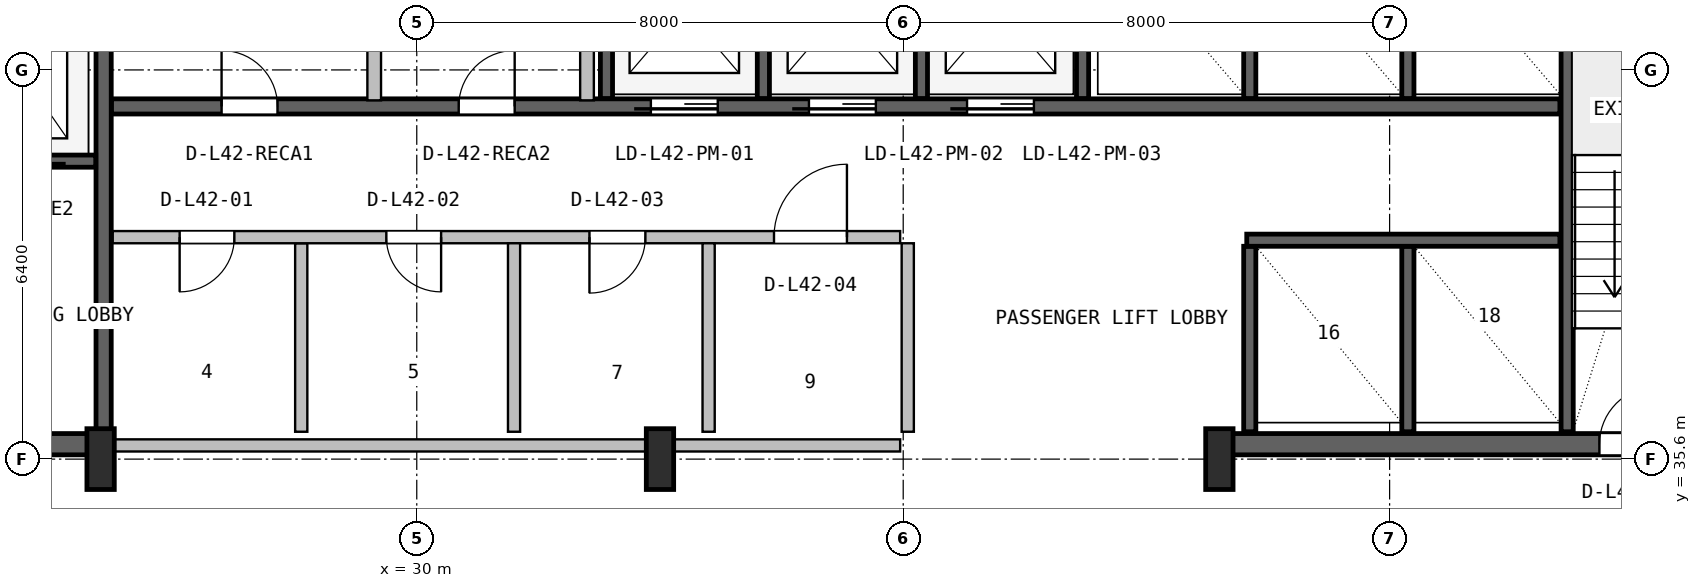
"""IFC4 building model, lengths in metres.
Left out: names, types, materials, properties, quantities, classifications, styles, units other than length and angle.
Written with IfcOpenShell. Run it as: python <this file> out.ifc"""

import sys

from ifc_helpers import new_model, si_unit, direction, frame, frame_2d, origin, origin_2d, place, context, subcontext, project, spatial, rectangle, i_section, extrude, source, transform, mapped, element, fill, save


model = new_model("IFC4")
c1 = context("Model", 3, precision=1e-05, world=origin(), true_north=direction((0.0, 1.0)))
c2 = subcontext(c1, "Body", "Model", "MODEL_VIEW")
j1 = project(units=[si_unit("LENGTHUNIT", "METRE"), si_unit("PLANEANGLEUNIT", "RADIAN")], contexts=[c1])
p1 = place(None, origin())
s1 = spatial("IfcSite", under=j1, at=p1, CompositionType="ELEMENT")
p2 = place(p1, origin())
s2 = spatial("IfcBuilding", under=s1, at=p2, CompositionType="ELEMENT")
p3 = place(p2, frame((0.0, 0.0, 172.4)))
s3 = spatial("IfcBuildingStorey", under=s2, at=p3, CompositionType="ELEMENT", Elevation=172.4)
p4 = place(p3, frame((15.67, 35.845, 0.0), z_axis=(0.0, 0.0, 1.0), x_axis=(1.0, 0.0, 0.0)))
e1 = element("IfcWall", 1, at=p4, inside=s3, PredefinedType="SHEAR", context=c2, shape_type="SweptSolid", body=[
    extrude(rectangle(XDim=9.13, YDim=0.35, at=frame_2d((4.565, 0.0))), origin(), (0.0, 0.0, 1.0), 3.55),
])
p5 = place(p4, frame((5.4, 0.0, 0.0)))
e2 = element("IfcOpeningElement", 2, at=p5, cuts=e1, PredefinedType="OPENING", context=c2, shape_type="SweptSolid", body=[
    extrude(rectangle(XDim=1.0, YDim=2.1, at=frame_2d((0.5, 1.05))), frame((0.0, 0.185, 0.0), z_axis=(0.0, -1.0, 0.0), x_axis=(1.0, 0.0, 0.0)), (0.0, 0.0, 1.0), 0.37),
])
p6 = place(p3, frame((43.2, 35.845, 0.0), z_axis=(0.0, 0.0, 1.0), x_axis=(1.0, 0.0, 0.0)))
e3 = element("IfcWall", 3, at=p6, inside=s3, PredefinedType="SHEAR", context=c2, shape_type="SweptSolid", body=[
    extrude(rectangle(XDim=9.13, YDim=0.35, at=frame_2d((4.565, 0.0))), origin(), (0.0, 0.0, 1.0), 3.55),
])
p7 = place(p6, frame((6.25, 0.0, 0.0)))
e4 = element("IfcOpeningElement", 4, at=p7, cuts=e3, PredefinedType="OPENING", context=c2, shape_type="SweptSolid", body=[
    extrude(rectangle(XDim=0.95, YDim=2.1, at=frame_2d((0.475, 1.05))), frame((0.0, 0.185, 0.0), z_axis=(0.0, -1.0, 0.0), x_axis=(1.0, 0.0, 0.0)), (0.0, 0.0, 1.0), 0.37),
])
m1 = source(origin(), c2, "Body", "SweptSolid", [
    extrude(i_section(OverallWidth=0.45, OverallDepth=1.0, WebThickness=0.016, FlangeThickness=0.03, FilletRadius=0.016, at=origin_2d()), origin(), (0.0, 0.0, 1.0), 3.8),
])
for number, where, z_axis, x_axis in (
    (5, (24.8, 35.6, 0.0), (0.0, 0.0, 1.0), (1.0, 0.0, 0.0)),
    (6, (34.0, 35.6, 0.0), (0.0, 0.0, 1.0), (1.0, 0.0, 0.0)),
    (7, (43.2, 35.6, 0.0), (0.0, 0.0, 1.0), (1.0, 0.0, 0.0)),
):
    element("IfcColumn", number, at=place(p3, frame(where, z_axis=z_axis, x_axis=x_axis)), inside=s3, PredefinedType="COLUMN", context=c2, shape_type="MappedRepresentation", body=[
        mapped(m1, transform((0.0, 0.0, 0.0), x_axis=(1.0, 0.0, 0.0), y_axis=(0.0, 1.0, 0.0), z_axis=(0.0, 0.0, 1.0), scale=1.0)),
    ])
p8 = place(p3, frame((24.85, 36.05, 0.0), z_axis=(0.0, 0.0, 1.0), x_axis=(0.0, 1.0, 0.0)))
e8 = element("IfcWall", 8, at=p8, inside=s3, PredefinedType="SHEAR", context=c2, shape_type="SweptSolid", body=[
    extrude(rectangle(XDim=10.45, YDim=0.25, at=frame_2d((5.225, 0.0))), origin(), (0.0, 0.0, 1.0), 3.55),
])
p9 = place(p3, frame((19.2, 40.5, 0.0), z_axis=(0.0, 0.0, 1.0), x_axis=(1.0, 0.0, 0.0)))
e9 = element("IfcWall", 9, at=p9, inside=s3, PredefinedType="SHEAR", context=c2, shape_type="SweptSolid", body=[
    extrude(rectangle(XDim=5.52, YDim=0.2, at=frame_2d((2.76, 0.0))), origin(), (0.0, 0.0, 1.0), 3.55),
])
p10 = place(p9, frame((1.05, 0.0, 0.0)))
e10 = element("IfcOpeningElement", 10, at=p10, cuts=e9, PredefinedType="OPENING", context=c2, shape_type="SweptSolid", body=[
    extrude(rectangle(XDim=1.1, YDim=2.18, at=frame_2d((0.55, 1.09))), frame((0.0, 0.11, 0.0), z_axis=(0.0, -1.0, 0.0), x_axis=(1.0, 0.0, 0.0)), (0.0, 0.0, 1.0), 0.22),
])
p11 = place(p9, frame((3.65, 0.0, 0.0)))
e11 = element("IfcOpeningElement", 11, at=p11, cuts=e9, PredefinedType="OPENING", context=c2, shape_type="SweptSolid", body=[
    extrude(rectangle(XDim=1.1, YDim=2.18, at=frame_2d((0.55, 1.09))), frame((0.0, 0.11, 0.0), z_axis=(0.0, -1.0, 0.0), x_axis=(1.0, 0.0, 0.0)), (0.0, 0.0, 1.0), 0.22),
])
p12 = place(p3, frame((48.92, 36.05, 0.0), z_axis=(0.0, 0.0, 1.0), x_axis=(0.0, 1.0, 0.0)))
e12 = element("IfcWall", 12, at=p12, inside=s3, PredefinedType="SHEAR", context=c2, shape_type="SweptSolid", body=[
    extrude(rectangle(XDim=10.5, YDim=0.2, at=frame_2d((5.25, 0.0))), origin(), (0.0, 0.0, 1.0), 3.55),
])
p13 = place(p3, frame((24.98, 41.4, 0.0), z_axis=(0.0, 0.0, 1.0), x_axis=(1.0, 0.0, 0.0)))
e13 = element("IfcWall", 13, at=p13, inside=s3, PredefinedType="SHEAR", context=c2, shape_type="SweptSolid", body=[
    extrude(rectangle(XDim=23.82, YDim=0.25, at=frame_2d((11.91, 0.0))), origin(), (0.0, 0.0, 1.0), 3.55),
])
p14 = place(p13, frame((8.87, 0.0, 0.0)))
e14 = element("IfcOpeningElement", 14, at=p14, cuts=e13, PredefinedType="OPENING", context=c2, shape_type="SweptSolid", body=[
    extrude(rectangle(XDim=1.1, YDim=2.18, at=frame_2d((0.55, 1.09))), frame((0.0, 0.135, 0.0), z_axis=(0.0, -1.0, 0.0), x_axis=(1.0, 0.0, 0.0)), (0.0, 0.0, 1.0), 0.27),
])
p15 = place(p13, frame((11.47, 0.0, 0.0)))
e15 = element("IfcOpeningElement", 15, at=p15, cuts=e13, PredefinedType="OPENING", context=c2, shape_type="SweptSolid", body=[
    extrude(rectangle(XDim=1.1, YDim=2.18, at=frame_2d((0.55, 1.09))), frame((0.0, 0.135, 0.0), z_axis=(0.0, -1.0, 0.0), x_axis=(1.0, 0.0, 0.0)), (0.0, 0.0, 1.0), 0.27),
])
p16 = place(p13, frame((14.07, 0.0, 0.0)))
e16 = element("IfcOpeningElement", 16, at=p16, cuts=e13, PredefinedType="OPENING", context=c2, shape_type="SweptSolid", body=[
    extrude(rectangle(XDim=1.1, YDim=2.18, at=frame_2d((0.55, 1.09))), frame((0.0, 0.135, 0.0), z_axis=(0.0, -1.0, 0.0), x_axis=(1.0, 0.0, 0.0)), (0.0, 0.0, 1.0), 0.27),
])
p17 = place(p13, frame((1.81, 0.0, 0.0)))
e17 = element("IfcOpeningElement", 17, at=p17, cuts=e13, PredefinedType="OPENING", context=c2, shape_type="SweptSolid", body=[
    extrude(rectangle(XDim=0.92, YDim=2.08, at=frame_2d((0.46, 1.04))), frame((0.0, 0.135, 0.0), z_axis=(0.0, -1.0, 0.0), x_axis=(1.0, 0.0, 0.0)), (0.0, 0.0, 1.0), 0.27),
])
p18 = place(p13, frame((5.71, 0.0, 0.0)))
e18 = element("IfcOpeningElement", 18, at=p18, cuts=e13, PredefinedType="OPENING", context=c2, shape_type="SweptSolid", body=[
    extrude(rectangle(XDim=0.92, YDim=2.08, at=frame_2d((0.46, 1.04))), frame((0.0, 0.135, 0.0), z_axis=(0.0, -1.0, 0.0), x_axis=(1.0, 0.0, 0.0)), (0.0, 0.0, 1.0), 0.27),
])
p19 = place(p3, frame((33.12, 41.53, 0.0), z_axis=(0.0, 0.0, 1.0), x_axis=(0.0, 1.0, 0.0)))
e19 = element("IfcWall", 19, at=p19, inside=s3, PredefinedType="SHEAR", context=c2, shape_type="SweptSolid", body=[
    extrude(rectangle(XDim=5.02, YDim=0.2, at=frame_2d((2.51, 0.0))), origin(), (0.0, 0.0, 1.0), 3.55),
])
for number, where, z_axis, x_axis in (
    (20, (35.7, 41.53, 0.0), (0.0, 0.0, 1.0), (0.0, 1.0, 0.0)),
    (21, (38.3, 41.53, 0.0), (0.0, 0.0, 1.0), (0.0, 1.0, 0.0)),
):
    element("IfcWall", number, at=place(p3, frame(where, z_axis=z_axis, x_axis=x_axis)), inside=s3, PredefinedType="SHEAR", context=c2, shape_type="SweptSolid", body=[
        extrude(rectangle(XDim=2.87, YDim=0.2, at=frame_2d((1.435, 0.0))), origin(), (0.0, 0.0, 1.0), 3.55),
    ])
p20 = place(p3, frame((40.95, 41.53, 0.0), z_axis=(0.0, 0.0, 1.0), x_axis=(0.0, 1.0, 0.0)))
e22 = element("IfcWall", 22, at=p20, inside=s3, PredefinedType="SHEAR", context=c2, shape_type="SweptSolid", body=[
    extrude(rectangle(XDim=5.02, YDim=0.2, at=frame_2d((2.51, 0.0))), origin(), (0.0, 0.0, 1.0), 3.55),
])
for number, where, z_axis, x_axis in (
    (23, (43.7, 41.53, 0.0), (0.0, 0.0, 1.0), (0.0, 1.0, 0.0)),
    (24, (46.3, 41.53, 0.0), (0.0, 0.0, 1.0), (0.0, 1.0, 0.0)),
):
    element("IfcWall", number, at=place(p3, frame(where, z_axis=z_axis, x_axis=x_axis)), inside=s3, PredefinedType="SHEAR", context=c2, shape_type="SweptSolid", body=[
        extrude(rectangle(XDim=2.87, YDim=0.2, at=frame_2d((1.435, 0.0))), origin(), (0.0, 0.0, 1.0), 3.55),
    ])
for number, where, z_axis, x_axis in (
    (25, (43.7, 36.05, 0.0), (0.0, 0.0, 1.0), (0.0, 1.0, 0.0)),
    (26, (46.3, 36.05, 0.0), (0.0, 0.0, 1.0), (0.0, 1.0, 0.0)),
):
    element("IfcWall", number, at=place(p3, frame(where, z_axis=z_axis, x_axis=x_axis)), inside=s3, PredefinedType="SHEAR", context=c2, shape_type="SweptSolid", body=[
        extrude(rectangle(XDim=3.05, YDim=0.2, at=frame_2d((1.525, 0.0))), origin(), (0.0, 0.0, 1.0), 3.55),
    ])
p21 = place(p3, frame((43.65, 39.2, 0.0), z_axis=(0.0, 0.0, 1.0), x_axis=(1.0, 0.0, 0.0)))
e27 = element("IfcWall", 27, at=p21, inside=s3, PredefinedType="SHEAR", context=c2, shape_type="SweptSolid", body=[
    extrude(rectangle(XDim=5.15, YDim=0.2, at=frame_2d((2.575, 0.0))), origin(), (0.0, 0.0, 1.0), 3.55),
])
p22 = place(p3, frame((25.0, 35.825, 0.0), z_axis=(0.0, 0.0, 1.0), x_axis=(1.0, 0.0, 0.0)))
e28 = element("IfcWall", 28, at=p22, inside=s3, PredefinedType="SOLIDWALL", context=c2, shape_type="SweptSolid", body=[
    extrude(rectangle(XDim=12.95, YDim=0.2, at=frame_2d((6.475, 0.0))), origin(), (0.0, 0.0, 1.0), 2.575),
])
p23 = place(p3, frame((28.1, 36.05, 0.0), z_axis=(0.0, 0.0, 1.0), x_axis=(0.0, 1.0, 0.0)))
e29 = element("IfcWall", 29, at=p23, inside=s3, PredefinedType="PLUMBINGWALL", context=c2, shape_type="SweptSolid", body=[
    extrude(rectangle(XDim=3.1, YDim=0.2, at=frame_2d((1.55, 0.0))), origin(), (0.0, 0.0, 1.0), 3.53),
])
p24 = place(p3, frame((25.0, 39.25, 0.0), z_axis=(0.0, 0.0, 1.0), x_axis=(1.0, 0.0, 0.0)))
e30 = element("IfcWall", 30, at=p24, inside=s3, PredefinedType="SOLIDWALL", context=c2, shape_type="SweptSolid", body=[
    extrude(rectangle(XDim=12.95, YDim=0.2, at=frame_2d((6.475, 0.0))), origin(), (0.0, 0.0, 1.0), 3.53),
])
p25 = place(p24, frame((1.1, 0.0, 0.0)))
e31 = element("IfcOpeningElement", 31, at=p25, cuts=e30, PredefinedType="OPENING", context=c2, shape_type="SweptSolid", body=[
    extrude(rectangle(XDim=0.9, YDim=2.06, at=frame_2d((0.45, 1.03))), frame((0.0, 0.11, 0.0), z_axis=(0.0, -1.0, 0.0), x_axis=(1.0, 0.0, 0.0)), (0.0, 0.0, 1.0), 0.22),
])
p26 = place(p24, frame((4.5, 0.0, 0.0)))
e32 = element("IfcOpeningElement", 32, at=p26, cuts=e30, PredefinedType="OPENING", context=c2, shape_type="SweptSolid", body=[
    extrude(rectangle(XDim=0.9, YDim=2.06, at=frame_2d((0.45, 1.03))), frame((0.0, 0.11, 0.0), z_axis=(0.0, -1.0, 0.0), x_axis=(1.0, 0.0, 0.0)), (0.0, 0.0, 1.0), 0.22),
])
p27 = place(p24, frame((7.84, 0.0, 0.0)))
e33 = element("IfcOpeningElement", 33, at=p27, cuts=e30, PredefinedType="OPENING", context=c2, shape_type="SweptSolid", body=[
    extrude(rectangle(XDim=0.92, YDim=2.08, at=frame_2d((0.46, 1.04))), frame((0.0, 0.11, 0.0), z_axis=(0.0, -1.0, 0.0), x_axis=(1.0, 0.0, 0.0)), (0.0, 0.0, 1.0), 0.22),
])
p28 = place(p24, frame((10.875, 0.0, 0.0)))
e34 = element("IfcOpeningElement", 34, at=p28, cuts=e30, PredefinedType="OPENING", context=c2, shape_type="SweptSolid", body=[
    extrude(rectangle(XDim=1.2, YDim=2.1, at=frame_2d((0.6, 1.05))), frame((0.0, 0.11, 0.0), z_axis=(0.0, -1.0, 0.0), x_axis=(1.0, 0.0, 0.0)), (0.0, 0.0, 1.0), 0.22),
])
p29 = place(p3, frame((31.6, 36.05, 0.0), z_axis=(0.0, 0.0, 1.0), x_axis=(0.0, 1.0, 0.0)))
e35 = element("IfcWall", 35, at=p29, inside=s3, PredefinedType="PLUMBINGWALL", context=c2, shape_type="SweptSolid", body=[
    extrude(rectangle(XDim=3.1, YDim=0.2, at=frame_2d((1.55, 0.0))), origin(), (0.0, 0.0, 1.0), 3.53),
])
for number, where, z_axis, x_axis in (
    (36, (34.8, 36.05, 0.0), (0.0, 0.0, 1.0), (0.0, 1.0, 0.0)),
    (37, (38.075, 36.05, 0.0), (0.0, 0.0, 1.0), (0.0, 1.0, 0.0)),
):
    element("IfcWall", number, at=place(p3, frame(where, z_axis=z_axis, x_axis=x_axis)), inside=s3, PredefinedType="SOLIDWALL", context=c2, shape_type="SweptSolid", body=[
        extrude(rectangle(XDim=3.1, YDim=0.2, at=frame_2d((1.55, 0.0))), origin(), (0.0, 0.0, 1.0), 3.53),
    ])
p30 = place(p3, frame((29.3, 41.5, 0.0), z_axis=(0.0, 0.0, 1.0), x_axis=(0.0, 1.0, 0.0)))
e38 = element("IfcWall", 38, at=p30, inside=s3, PredefinedType="PARTITIONING", context=c2, shape_type="SweptSolid", body=[
    extrude(rectangle(XDim=2.288, YDim=0.225, at=frame_2d((1.144, 0.0))), origin(), (0.0, 0.0, 1.0), 3.53),
])
p31 = place(p3, frame((32.8, 41.5, 0.0), z_axis=(0.0, 0.0, 1.0), x_axis=(0.0, 1.0, 0.0)))
e39 = element("IfcWall", 39, at=p31, inside=s3, PredefinedType="PARTITIONING", context=c2, shape_type="SweptSolid", body=[
    extrude(rectangle(XDim=5.02, YDim=0.225, at=frame_2d((2.51, 0.0))), origin(), (0.0, 0.0, 1.0), 3.53),
])
m2 = source(origin(), c2, "Body", "SweptSolid", [
    extrude(rectangle(XDim=0.95, YDim=2.1, at=frame_2d((0.475, 1.05))), frame((0.0, 0.025, 0.0), z_axis=(0.0, -1.0, 0.0), x_axis=(1.0, 0.0, 0.0)), (0.0, 0.0, 1.0), 0.05),
])
p32 = place(p7, origin())
e40 = element("IfcDoor", 40, at=p32, inside=s3, OperationType="SINGLE_SWING_RIGHT", PredefinedType="DOOR", context=c2, shape_type="MappedRepresentation", body=[
    mapped(m2, transform((0.0, 0.0, 0.0), x_axis=(1.0, 0.0, 0.0), y_axis=(0.0, 1.0, 0.0), z_axis=(0.0, 0.0, 1.0), scale=1.0)),
])
fill(e4, e40)
m3 = source(origin(), c2, "Body", "SweptSolid", [
    extrude(rectangle(XDim=1.1, YDim=2.18, at=frame_2d((0.55, 1.09))), frame((0.0, 0.025, 0.0), z_axis=(0.0, -1.0, 0.0), x_axis=(1.0, 0.0, 0.0)), (0.0, 0.0, 1.0), 0.05),
])
p33 = place(p14, frame((1.1, 0.0, 0.0), z_axis=(0.0, 0.0, 1.0), x_axis=(-1.0, 0.0, 0.0)))
e41 = element("IfcDoor", 41, at=p33, inside=s3, OperationType="SLIDING_TO_LEFT", PredefinedType="DOOR", context=c2, shape_type="MappedRepresentation", body=[
    mapped(m3, transform((0.0, 0.0, 0.0), x_axis=(1.0, 0.0, 0.0), y_axis=(0.0, 1.0, 0.0), z_axis=(0.0, 0.0, 1.0), scale=1.0)),
])
fill(e14, e41)
p34 = place(p15, frame((1.1, 0.0, 0.0), z_axis=(0.0, 0.0, 1.0), x_axis=(-1.0, 0.0, 0.0)))
e42 = element("IfcDoor", 42, at=p34, inside=s3, OperationType="SLIDING_TO_LEFT", PredefinedType="DOOR", context=c2, shape_type="MappedRepresentation", body=[
    mapped(m3, transform((0.0, 0.0, 0.0), x_axis=(1.0, 0.0, 0.0), y_axis=(0.0, 1.0, 0.0), z_axis=(0.0, 0.0, 1.0), scale=1.0)),
])
fill(e15, e42)
p35 = place(p16, frame((1.1, 0.0, 0.0), z_axis=(0.0, 0.0, 1.0), x_axis=(-1.0, 0.0, 0.0)))
e43 = element("IfcDoor", 43, at=p35, inside=s3, OperationType="SLIDING_TO_LEFT", PredefinedType="DOOR", context=c2, shape_type="MappedRepresentation", body=[
    mapped(m3, transform((0.0, 0.0, 0.0), x_axis=(1.0, 0.0, 0.0), y_axis=(0.0, 1.0, 0.0), z_axis=(0.0, 0.0, 1.0), scale=1.0)),
])
fill(e16, e43)
m4 = source(origin(), c2, "Body", "SweptSolid", [
    extrude(rectangle(XDim=0.92, YDim=2.08, at=frame_2d((0.46, 1.04))), frame((0.0, 0.025, 0.0), z_axis=(0.0, -1.0, 0.0), x_axis=(1.0, 0.0, 0.0)), (0.0, 0.0, 1.0), 0.05),
])
p36 = place(p17, origin())
e44 = element("IfcDoor", 44, at=p36, inside=s3, OperationType="SINGLE_SWING_LEFT", PredefinedType="DOOR", context=c2, shape_type="MappedRepresentation", body=[
    mapped(m4, transform((0.0, 0.0, 0.0), x_axis=(1.0, 0.0, 0.0), y_axis=(0.0, 1.0, 0.0), z_axis=(0.0, 0.0, 1.0), scale=1.0)),
])
fill(e17, e44)
p37 = place(p18, origin())
e45 = element("IfcDoor", 45, at=p37, inside=s3, OperationType="SINGLE_SWING_RIGHT", PredefinedType="DOOR", context=c2, shape_type="MappedRepresentation", body=[
    mapped(m4, transform((0.0, 0.0, 0.0), x_axis=(1.0, 0.0, 0.0), y_axis=(0.0, 1.0, 0.0), z_axis=(0.0, 0.0, 1.0), scale=1.0)),
])
fill(e18, e45)
m5 = source(origin(), c2, "Body", "SweptSolid", [
    extrude(rectangle(XDim=0.9, YDim=2.06, at=frame_2d((0.45, 1.03))), frame((0.0, 0.025, 0.0), z_axis=(0.0, -1.0, 0.0), x_axis=(1.0, 0.0, 0.0)), (0.0, 0.0, 1.0), 0.05),
])
p38 = place(p25, frame((0.9, 0.0, 0.0), z_axis=(0.0, 0.0, 1.0), x_axis=(-1.0, 0.0, 0.0)))
e46 = element("IfcDoor", 46, at=p38, inside=s3, OperationType="SINGLE_SWING_LEFT", PredefinedType="DOOR", context=c2, shape_type="MappedRepresentation", body=[
    mapped(m5, transform((0.0, 0.0, 0.0), x_axis=(1.0, 0.0, 0.0), y_axis=(0.0, 1.0, 0.0), z_axis=(0.0, 0.0, 1.0), scale=1.0)),
])
fill(e31, e46)
p39 = place(p26, frame((0.9, 0.0, 0.0), z_axis=(0.0, 0.0, 1.0), x_axis=(-1.0, 0.0, 0.0)))
e47 = element("IfcDoor", 47, at=p39, inside=s3, OperationType="SINGLE_SWING_RIGHT", PredefinedType="DOOR", context=c2, shape_type="MappedRepresentation", body=[
    mapped(m5, transform((0.0, 0.0, 0.0), x_axis=(1.0, 0.0, 0.0), y_axis=(0.0, 1.0, 0.0), z_axis=(0.0, 0.0, 1.0), scale=1.0)),
])
fill(e32, e47)
p40 = place(p27, frame((0.92, 0.0, 0.0), z_axis=(0.0, 0.0, 1.0), x_axis=(-1.0, 0.0, 0.0)))
e48 = element("IfcDoor", 48, at=p40, inside=s3, OperationType="SINGLE_SWING_LEFT", PredefinedType="DOOR", context=c2, shape_type="MappedRepresentation", body=[
    mapped(m4, transform((0.0, 0.0, 0.0), x_axis=(1.0, 0.0, 0.0), y_axis=(0.0, 1.0, 0.0), z_axis=(0.0, 0.0, 1.0), scale=1.0)),
])
fill(e33, e48)
m6 = source(origin(), c2, "Body", "SweptSolid", [
    extrude(rectangle(XDim=1.2, YDim=2.1, at=frame_2d((0.6, 1.05))), frame((0.0, 0.025, 0.0), z_axis=(0.0, -1.0, 0.0), x_axis=(1.0, 0.0, 0.0)), (0.0, 0.0, 1.0), 0.05),
])
p41 = place(p28, origin())
e49 = element("IfcDoor", 49, at=p41, inside=s3, OperationType="SINGLE_SWING_RIGHT", PredefinedType="DOOR", context=c2, shape_type="MappedRepresentation", body=[
    mapped(m6, transform((0.0, 0.0, 0.0), x_axis=(1.0, 0.0, 0.0), y_axis=(0.0, 1.0, 0.0), z_axis=(0.0, 0.0, 1.0), scale=1.0)),
])
fill(e34, e49)
save(model, sys.argv[1])
